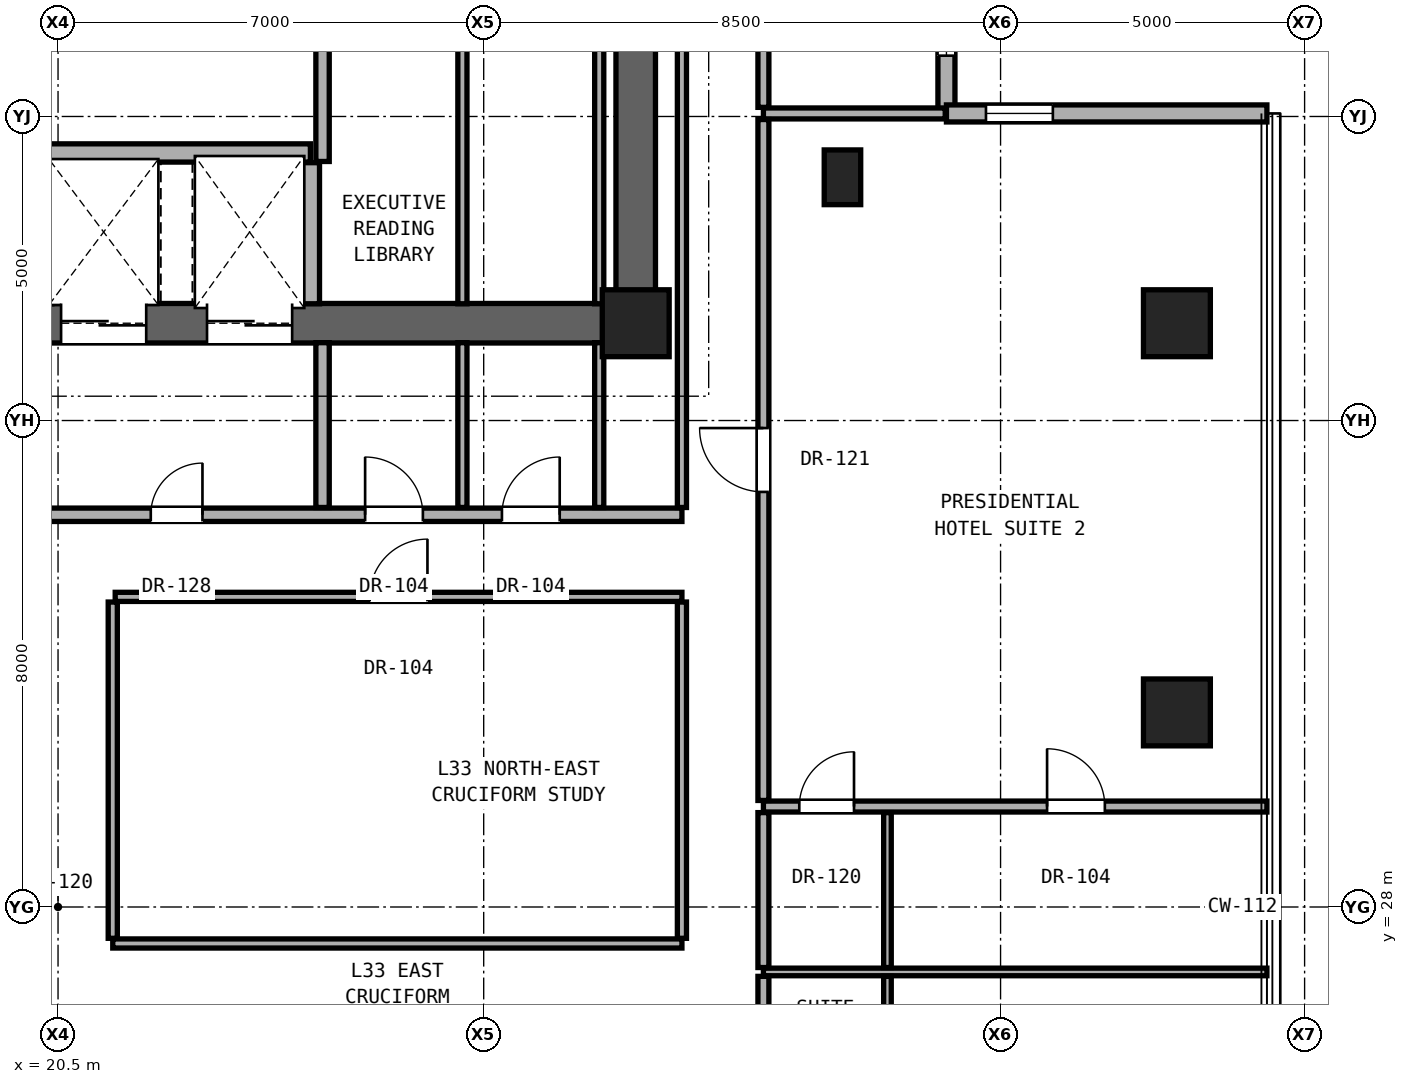
"""IFC4 building model, lengths in metres.
Left out: names, types, materials, properties, quantities, classifications, styles, units other than length and angle.
Written with IfcOpenShell. Run it as: python <this file> out.ifc"""

import sys

from ifc_helpers import new_model, si_unit, direction, frame, frame_2d, origin, origin_2d, place, context, subcontext, project, spatial, rectangle, hollow_rectangle, extrude, element, fill, save


model = new_model("IFC4")
c1 = context("Model", 3, precision=1e-05, world=origin(), true_north=direction((0.0, 1.0)))
c2 = subcontext(c1, "Body", "Model", "MODEL_VIEW")
j1 = project(units=[si_unit("LENGTHUNIT", "METRE"), si_unit("PLANEANGLEUNIT", "RADIAN")], contexts=[c1])
p1 = place(None, origin())
s1 = spatial("IfcSite", under=j1, at=p1, CompositionType="ELEMENT")
p2 = place(p1, origin())
s2 = spatial("IfcBuilding", under=s1, at=p2, CompositionType="ELEMENT")
p3 = place(p2, frame((0.0, 0.0, 118.1)))
s3 = spatial("IfcBuildingStorey", under=s2, at=p3, CompositionType="ELEMENT", Elevation=118.1)
p4 = place(p3, frame((30.0, 37.6, 0.0), z_axis=(0.0, 0.0, 1.0), x_axis=(1.0, 0.0, 0.0)))
e1 = element("IfcColumn", 1, at=p4, inside=s3, PredefinedType="COLUMN", context=c2, shape_type="SweptSolid", body=[
    extrude(rectangle(XDim=1.1, YDim=1.1, at=origin_2d()), origin(), (0.0, 0.0, 1.0), 3.3),
])
for number, where, z_axis, x_axis in (
    (2, (38.9, 31.2, 0.0), (0.0, 0.0, 1.0), (1.0, 0.0, 0.0)),
    (3, (38.9, 37.6, 0.0), (0.0, 0.0, 1.0), (1.0, 0.0, 0.0)),
):
    element("IfcColumn", number, at=place(p3, frame(where, z_axis=z_axis, x_axis=x_axis)), inside=s3, PredefinedType="COLUMN", context=c2, shape_type="SweptSolid", body=[
        extrude(hollow_rectangle(XDim=1.1, YDim=1.1, WallThickness=0.06, at=origin_2d()), origin(), (0.0, 0.0, 1.0), 3.3),
    ])
p5 = place(p3, frame((33.4, 40.0, 0.0), z_axis=(0.0, 0.0, 1.0), x_axis=(1.0, 0.0, 0.0)))
e4 = element("IfcColumn", 4, at=p5, inside=s3, PredefinedType="PILASTER", context=c2, shape_type="SweptSolid", body=[
    extrude(rectangle(XDim=0.6, YDim=0.9, at=origin_2d()), origin(), (0.0, 0.0, 1.0), 3.3),
])
p6 = place(p3, frame((30.0, 37.6, 0.0), z_axis=(0.0, 0.0, 1.0), x_axis=(0.0, 1.0, 0.0)))
e5 = element("IfcWall", 5, at=p6, inside=s3, PredefinedType="SHEAR", context=c2, shape_type="SweptSolid", body=[
    extrude(rectangle(XDim=6.0, YDim=0.65, at=frame_2d((3.0, 0.0))), origin(), (0.0, 0.0, 1.0), 3.08),
])
p7 = place(p3, frame((11.0, 37.6, 0.0), z_axis=(0.0, 0.0, 1.0), x_axis=(1.0, 0.0, 0.0)))
e6 = element("IfcWall", 6, at=p7, inside=s3, PredefinedType="SHEAR", context=c2, shape_type="SweptSolid", body=[
    extrude(rectangle(XDim=19.0, YDim=0.65, at=frame_2d((9.5, 0.0))), origin(), (0.0, 0.0, 1.0), 3.08),
])
p8 = place(p7, frame((1.06, 0.0, 0.0)))
e7 = element("IfcOpeningElement", 7, at=p8, cuts=e6, PredefinedType="OPENING", context=c2, shape_type="SweptSolid", body=[
    extrude(rectangle(XDim=1.15, YDim=2.2, at=frame_2d((0.575, 1.1))), frame((0.0, 0.335, 0.0), z_axis=(0.0, -1.0, 0.0), x_axis=(1.0, 0.0, 0.0)), (0.0, 0.0, 1.0), 0.67),
])
p9 = place(p7, frame((9.55, 0.0, 0.0)))
e8 = element("IfcOpeningElement", 8, at=p9, cuts=e6, PredefinedType="OPENING", context=c2, shape_type="SweptSolid", body=[
    extrude(rectangle(XDim=1.4, YDim=2.35, at=frame_2d((0.7, 1.175))), frame((0.0, 0.335, 0.0), z_axis=(0.0, -1.0, 0.0), x_axis=(1.0, 0.0, 0.0)), (0.0, 0.0, 1.0), 0.67),
])
p10 = place(p7, frame((11.95, 0.0, 0.0)))
e9 = element("IfcOpeningElement", 9, at=p10, cuts=e6, PredefinedType="OPENING", context=c2, shape_type="SweptSolid", body=[
    extrude(rectangle(XDim=1.4, YDim=2.35, at=frame_2d((0.7, 1.175))), frame((0.0, 0.335, 0.0), z_axis=(0.0, -1.0, 0.0), x_axis=(1.0, 0.0, 0.0)), (0.0, 0.0, 1.0), 0.67),
])
p11 = place(p3, frame((35.11, 41.05, 0.0), z_axis=(0.0, 0.0, 1.0), x_axis=(0.0, 1.0, 0.0)))
e10 = element("IfcWall", 10, at=p11, inside=s3, PredefinedType="SOLIDWALL", context=c2, shape_type="SweptSolid", body=[
    extrude(rectangle(XDim=5.27, YDim=0.28, at=frame_2d((2.635, 0.0))), origin(), (0.0, 0.0, 1.0), 3.06),
])
p12 = place(p11, frame((0.95, 0.0, 0.85)))
e11 = element("IfcOpeningElement", 11, at=p12, cuts=e10, PredefinedType="OPENING", context=c2, shape_type="SweptSolid", body=[
    extrude(rectangle(XDim=1.1, YDim=2.0, at=frame_2d((0.55, 1.0))), frame((0.0, 0.15, 0.0), z_axis=(0.0, -1.0, 0.0), x_axis=(1.0, 0.0, 0.0)), (0.0, 0.0, 1.0), 0.3),
])
p13 = place(p3, frame((40.38, 41.05, 0.0), z_axis=(0.0, 0.0, 1.0), x_axis=(-1.0, 0.0, 0.0)))
e12 = element("IfcWall", 12, at=p13, inside=s3, PredefinedType="SOLIDWALL", context=c2, shape_type="SweptSolid", body=[
    extrude(rectangle(XDim=5.27, YDim=0.28, at=frame_2d((2.635, 0.0))), origin(), (0.0, 0.0, 1.0), 3.06),
])
p14 = place(p13, frame((3.52, 0.0, 0.85)))
e13 = element("IfcOpeningElement", 13, at=p14, cuts=e12, PredefinedType="OPENING", context=c2, shape_type="SweptSolid", body=[
    extrude(rectangle(XDim=1.1, YDim=2.0, at=frame_2d((0.55, 1.0))), frame((0.0, 0.15, 0.0), z_axis=(0.0, -1.0, 0.0), x_axis=(1.0, 0.0, 0.0)), (0.0, 0.0, 1.0), 0.3),
])
p15 = place(p3, frame((32.1, 26.932, 0.0), z_axis=(0.0, 0.0, 1.0), x_axis=(1.0, 0.0, 0.0)))
e14 = element("IfcWall", 14, at=p15, inside=s3, PredefinedType="PARTITIONING", context=c2, shape_type="SweptSolid", body=[
    extrude(rectangle(XDim=8.28, YDim=0.125, at=frame_2d((4.14, 0.0))), origin(), (0.0, 0.0, 1.0), 2.299),
])
p16 = place(p3, frame((21.4, 27.4, 0.0), z_axis=(0.0, 0.0, 1.0), x_axis=(1.0, 0.0, 0.0)))
e15 = element("IfcWall", 15, at=p16, inside=s3, PredefinedType="PARTITIONING", context=c2, shape_type="SweptSolid", body=[
    extrude(rectangle(XDim=9.36, YDim=0.15, at=frame_2d((4.68, 0.0))), origin(), (0.0, 0.0, 1.0), 2.216),
])
p17 = place(p3, frame((32.1, 29.652, 0.0), z_axis=(0.0, 0.0, 1.0), x_axis=(1.0, 0.0, 0.0)))
e16 = element("IfcWall", 16, at=p17, inside=s3, PredefinedType="PARTITIONING", context=c2, shape_type="SweptSolid", body=[
    extrude(rectangle(XDim=8.28, YDim=0.18, at=frame_2d((4.14, 0.0))), origin(), (0.0, 0.0, 1.0), 2.299),
])
p18 = place(p17, frame((4.665, 0.0, 0.0)))
e17 = element("IfcOpeningElement", 17, at=p18, cuts=e16, PredefinedType="OPENING", context=c2, shape_type="SweptSolid", body=[
    extrude(rectangle(XDim=0.95, YDim=2.15, at=frame_2d((0.475, 1.075))), frame((0.0, 0.1, 0.0), z_axis=(0.0, -1.0, 0.0), x_axis=(1.0, 0.0, 0.0)), (0.0, 0.0, 1.0), 0.2),
])
p19 = place(p17, frame((0.59, 0.0, 0.0)))
e18 = element("IfcOpeningElement", 18, at=p19, cuts=e16, PredefinedType="OPENING", context=c2, shape_type="SweptSolid", body=[
    extrude(rectangle(XDim=0.9, YDim=2.1, at=frame_2d((0.45, 1.05))), frame((0.0, 0.1, 0.0), z_axis=(0.0, -1.0, 0.0), x_axis=(1.0, 0.0, 0.0)), (0.0, 0.0, 1.0), 0.2),
])
p20 = place(p3, frame((21.44, 33.1, 0.0), z_axis=(0.0, 0.0, 1.0), x_axis=(1.0, 0.0, 0.0)))
e19 = element("IfcWall", 19, at=p20, inside=s3, PredefinedType="PARTITIONING", context=c2, shape_type="SweptSolid", body=[
    extrude(rectangle(XDim=9.32, YDim=0.15, at=frame_2d((4.66, 0.0))), origin(), (0.0, 0.0, 1.0), 2.216),
])
p21 = place(p20, frame((4.185, 0.0, 0.0)))
e20 = element("IfcOpeningElement", 20, at=p21, cuts=e19, PredefinedType="OPENING", context=c2, shape_type="SweptSolid", body=[
    extrude(rectangle(XDim=0.95, YDim=2.15, at=frame_2d((0.475, 1.075))), frame((0.0, 0.085, 0.0), z_axis=(0.0, -1.0, 0.0), x_axis=(1.0, 0.0, 0.0)), (0.0, 0.0, 1.0), 0.17),
])
p22 = place(p3, frame((15.59, 34.45, 0.0), z_axis=(0.0, 0.0, 1.0), x_axis=(1.0, 0.0, 0.0)))
e21 = element("IfcWall", 21, at=p22, inside=s3, PredefinedType="SOLIDWALL", context=c2, shape_type="SweptSolid", body=[
    extrude(rectangle(XDim=15.17, YDim=0.22, at=frame_2d((7.585, 0.0))), origin(), (0.0, 0.0, 1.0), 2.216),
])
p23 = place(p22, frame((6.435, 0.0, 0.0)))
e22 = element("IfcOpeningElement", 22, at=p23, cuts=e21, PredefinedType="OPENING", context=c2, shape_type="SweptSolid", body=[
    extrude(rectangle(XDim=0.85, YDim=2.01, at=frame_2d((0.425, 1.005))), frame((0.0, 0.12, 0.0), z_axis=(0.0, -1.0, 0.0), x_axis=(1.0, 0.0, 0.0)), (0.0, 0.0, 1.0), 0.24),
])
p24 = place(p22, frame((9.96, 0.0, 0.0)))
e23 = element("IfcOpeningElement", 23, at=p24, cuts=e21, PredefinedType="OPENING", context=c2, shape_type="SweptSolid", body=[
    extrude(rectangle(XDim=0.95, YDim=2.15, at=frame_2d((0.475, 1.075))), frame((0.0, 0.12, 0.0), z_axis=(0.0, -1.0, 0.0), x_axis=(1.0, 0.0, 0.0)), (0.0, 0.0, 1.0), 0.24),
])
p25 = place(p22, frame((12.21, 0.0, 0.0)))
e24 = element("IfcOpeningElement", 24, at=p25, cuts=e21, PredefinedType="OPENING", context=c2, shape_type="SweptSolid", body=[
    extrude(rectangle(XDim=0.95, YDim=2.15, at=frame_2d((0.475, 1.075))), frame((0.0, 0.12, 0.0), z_axis=(0.0, -1.0, 0.0), x_axis=(1.0, 0.0, 0.0)), (0.0, 0.0, 1.0), 0.24),
])
p26 = place(p22, frame((0.675, 0.0, 0.0)))
e25 = element("IfcOpeningElement", 25, at=p26, cuts=e21, PredefinedType="OPENING", context=c2, shape_type="SweptSolid", body=[
    extrude(rectangle(XDim=0.85, YDim=2.01, at=frame_2d((0.425, 1.005))), frame((0.0, 0.12, 0.0), z_axis=(0.0, -1.0, 0.0), x_axis=(1.0, 0.0, 0.0)), (0.0, 0.0, 1.0), 0.24),
])
p27 = place(p22, frame((2.835, 0.0, 0.0)))
e26 = element("IfcOpeningElement", 26, at=p27, cuts=e21, PredefinedType="OPENING", context=c2, shape_type="SweptSolid", body=[
    extrude(rectangle(XDim=0.85, YDim=2.01, at=frame_2d((0.425, 1.005))), frame((0.0, 0.12, 0.0), z_axis=(0.0, -1.0, 0.0), x_axis=(1.0, 0.0, 0.0)), (0.0, 0.0, 1.0), 0.24),
])
p28 = place(p3, frame((20.25, 40.4, 0.0), z_axis=(0.0, 0.0, 1.0), x_axis=(1.0, 0.0, 0.0)))
e27 = element("IfcWall", 27, at=p28, inside=s3, PredefinedType="SOLIDWALL", context=c2, shape_type="SweptSolid", body=[
    extrude(rectangle(XDim=4.4, YDim=0.3, at=frame_2d((2.2, 0.0))), origin(), (0.0, 0.0, 1.0), 3.08),
])
p29 = place(p3, frame((32.1, 41.05, 0.0), z_axis=(0.0, 0.0, 1.0), x_axis=(1.0, 0.0, 0.0)))
e28 = element("IfcWall", 28, at=p29, inside=s3, PredefinedType="PARTITIONING", context=c2, shape_type="SweptSolid", body=[
    extrude(rectangle(XDim=2.99, YDim=0.18, at=frame_2d((1.495, 0.0))), origin(), (0.0, 0.0, 1.0), 3.08),
])
p30 = place(p3, frame((20.25, 37.92, 0.0), z_axis=(0.0, 0.0, 1.0), x_axis=(0.0, 1.0, 0.0)))
e29 = element("IfcWall", 29, at=p30, inside=s3, PredefinedType="SOLIDWALL", context=c2, shape_type="SweptSolid", body=[
    extrude(rectangle(XDim=2.32, YDim=0.3, at=frame_2d((1.16, 0.0))), origin(), (0.0, 0.0, 1.0), 3.08),
])
p31 = place(p3, frame((21.4, 27.485, 0.0), z_axis=(0.0, 0.0, 1.0), x_axis=(0.0, 1.0, 0.0)))
e30 = element("IfcWall", 30, at=p31, inside=s3, PredefinedType="PARTITIONING", context=c2, shape_type="SweptSolid", body=[
    extrude(rectangle(XDim=5.53, YDim=0.15, at=frame_2d((2.765, 0.0))), origin(), (0.0, 0.0, 1.0), 2.216),
])
p32 = place(p3, frame((24.65, 37.92, 0.0), z_axis=(0.0, 0.0, 1.0), x_axis=(0.0, 1.0, 0.0)))
e31 = element("IfcWall", 31, at=p32, inside=s3, PredefinedType="SOLIDWALL", context=c2, shape_type="SweptSolid", body=[
    extrude(rectangle(XDim=2.32, YDim=0.3, at=frame_2d((1.16, 0.0))), origin(), (0.0, 0.0, 1.0), 3.08),
])
p33 = place(p3, frame((24.85, 34.57, 0.0), z_axis=(0.0, 0.0, 1.0), x_axis=(0.0, 1.0, 0.0)))
e32 = element("IfcWall", 32, at=p33, inside=s3, PredefinedType="SOLIDWALL", context=c2, shape_type="SweptSolid", body=[
    extrude(rectangle(XDim=2.71, YDim=0.22, at=frame_2d((1.355, 0.0))), origin(), (0.0, 0.0, 1.0), 3.08),
])
p34 = place(p3, frame((24.85, 40.26, 0.0), z_axis=(0.0, 0.0, 1.0), x_axis=(0.0, 1.0, 0.0)))
e33 = element("IfcWall", 33, at=p34, inside=s3, PredefinedType="SOLIDWALL", context=c2, shape_type="SweptSolid", body=[
    extrude(rectangle(XDim=2.94, YDim=0.22, at=frame_2d((1.47, 0.0))), origin(), (0.0, 0.0, 1.0), 3.08),
])
p35 = place(p3, frame((27.15, 34.57, 0.0), z_axis=(0.0, 0.0, 1.0), x_axis=(0.0, 1.0, 0.0)))
e34 = element("IfcWall", 34, at=p35, inside=s3, PredefinedType="PARTITIONING", context=c2, shape_type="SweptSolid", body=[
    extrude(rectangle(XDim=2.71, YDim=0.15, at=frame_2d((1.355, 0.0))), origin(), (0.0, 0.0, 1.0), 3.08),
])
p36 = place(p3, frame((27.15, 37.92, 0.0), z_axis=(0.0, 0.0, 1.0), x_axis=(0.0, 1.0, 0.0)))
e35 = element("IfcWall", 35, at=p36, inside=s3, PredefinedType="PARTITIONING", context=c2, shape_type="SweptSolid", body=[
    extrude(rectangle(XDim=5.28, YDim=0.15, at=frame_2d((2.64, 0.0))), origin(), (0.0, 0.0, 1.0), 3.08),
])
p37 = place(p3, frame((29.4, 34.57, 0.0), z_axis=(0.0, 0.0, 1.0), x_axis=(0.0, 1.0, 0.0)))
e36 = element("IfcWall", 36, at=p37, inside=s3, PredefinedType="PARTITIONING", context=c2, shape_type="SweptSolid", body=[
    extrude(rectangle(XDim=2.71, YDim=0.15, at=frame_2d((1.355, 0.0))), origin(), (0.0, 0.0, 1.0), 3.08),
])
p38 = place(p3, frame((29.4, 37.92, 0.0), z_axis=(0.0, 0.0, 1.0), x_axis=(0.0, 1.0, 0.0)))
e37 = element("IfcWall", 37, at=p38, inside=s3, PredefinedType="PARTITIONING", context=c2, shape_type="SweptSolid", body=[
    extrude(rectangle(XDim=5.28, YDim=0.15, at=frame_2d((2.64, 0.0))), origin(), (0.0, 0.0, 1.0), 3.08),
])
p39 = place(p3, frame((30.76, 27.485, 0.0), z_axis=(0.0, 0.0, 1.0), x_axis=(0.0, 1.0, 0.0)))
e38 = element("IfcWall", 38, at=p39, inside=s3, PredefinedType="PARTITIONING", context=c2, shape_type="SweptSolid", body=[
    extrude(rectangle(XDim=5.53, YDim=0.15, at=frame_2d((2.765, 0.0))), origin(), (0.0, 0.0, 1.0), 2.299),
])
p40 = place(p3, frame((30.76, 34.57, 0.0), z_axis=(0.0, 0.0, 1.0), x_axis=(0.0, 1.0, 0.0)))
e39 = element("IfcWall", 39, at=p40, inside=s3, PredefinedType="PARTITIONING", context=c2, shape_type="SweptSolid", body=[
    extrude(rectangle(XDim=9.095, YDim=0.15, at=frame_2d((4.547, 0.0))), origin(), (0.0, 0.0, 1.0), 2.456),
])
p41 = place(p3, frame((32.1, 24.312, 0.0), z_axis=(0.0, 0.0, 1.0), x_axis=(0.0, 1.0, 0.0)))
e40 = element("IfcWall", 40, at=p41, inside=s3, PredefinedType="PARTITIONING", context=c2, shape_type="SweptSolid", body=[
    extrude(rectangle(XDim=2.548, YDim=0.18, at=frame_2d((1.274, 0.0))), origin(), (0.0, 0.0, 1.0), 2.299),
])
p42 = place(p3, frame((32.1, 27.004, 0.0), z_axis=(0.0, 0.0, 1.0), x_axis=(0.0, 1.0, 0.0)))
e41 = element("IfcWall", 41, at=p42, inside=s3, PredefinedType="PARTITIONING", context=c2, shape_type="SweptSolid", body=[
    extrude(rectangle(XDim=2.548, YDim=0.18, at=frame_2d((1.274, 0.0))), origin(), (0.0, 0.0, 1.0), 3.08),
])
p43 = place(p3, frame((32.1, 29.752, 0.0), z_axis=(0.0, 0.0, 1.0), x_axis=(0.0, 1.0, 0.0)))
e42 = element("IfcWall", 42, at=p43, inside=s3, PredefinedType="PARTITIONING", context=c2, shape_type="SweptSolid", body=[
    extrude(rectangle(XDim=11.198, YDim=0.18, at=frame_2d((5.599, 0.0))), origin(), (0.0, 0.0, 1.0), 2.299),
])
p44 = place(p43, frame((5.074, 0.0, 0.0)))
e43 = element("IfcOpeningElement", 43, at=p44, cuts=e42, PredefinedType="OPENING", context=c2, shape_type="SweptSolid", body=[
    extrude(rectangle(XDim=1.05, YDim=2.2, at=frame_2d((0.525, 1.1))), frame((0.0, 0.1, 0.0), z_axis=(0.0, -1.0, 0.0), x_axis=(1.0, 0.0, 0.0)), (0.0, 0.0, 1.0), 0.2),
])
p45 = place(p3, frame((32.1, 41.15, 0.0), z_axis=(0.0, 0.0, 1.0), x_axis=(0.0, 1.0, 0.0)))
e44 = element("IfcWall", 44, at=p45, inside=s3, PredefinedType="PARTITIONING", context=c2, shape_type="SweptSolid", body=[
    extrude(rectangle(XDim=5.17, YDim=0.18, at=frame_2d((2.585, 0.0))), origin(), (0.0, 0.0, 1.0), 3.08),
])
p46 = place(p45, frame((2.11, 0.0, 0.0)))
e45 = element("IfcOpeningElement", 45, at=p46, cuts=e44, PredefinedType="OPENING", context=c2, shape_type="SweptSolid", body=[
    extrude(rectangle(XDim=0.95, YDim=2.15, at=frame_2d((0.475, 1.075))), frame((0.0, 0.1, 0.0), z_axis=(0.0, -1.0, 0.0), x_axis=(1.0, 0.0, 0.0)), (0.0, 0.0, 1.0), 0.2),
])
p47 = place(p3, frame((34.14, 24.312, 0.0), z_axis=(0.0, 0.0, 1.0), x_axis=(0.0, 1.0, 0.0)))
e46 = element("IfcWall", 46, at=p47, inside=s3, PredefinedType="PARTITIONING", context=c2, shape_type="SweptSolid", body=[
    extrude(rectangle(XDim=2.548, YDim=0.125, at=frame_2d((1.274, 0.0))), origin(), (0.0, 0.0, 1.0), 2.299),
])
p48 = place(p3, frame((34.14, 27.004, 0.0), z_axis=(0.0, 0.0, 1.0), x_axis=(0.0, 1.0, 0.0)))
e47 = element("IfcWall", 47, at=p48, inside=s3, PredefinedType="PARTITIONING", context=c2, shape_type="SweptSolid", body=[
    extrude(rectangle(XDim=2.548, YDim=0.125, at=frame_2d((1.274, 0.0))), origin(), (0.0, 0.0, 1.0), 3.08),
])
p49 = place(p12, origin())
e48 = element("IfcWindow", 48, at=p49, inside=s3, PartitioningType="SINGLE_PANEL", PredefinedType="WINDOW", context=c2, shape_type="SweptSolid", body=[
    extrude(rectangle(XDim=1.1, YDim=2.0, at=frame_2d((0.55, 1.0))), frame((0.0, 0.03, 0.0), z_axis=(0.0, -1.0, 0.0), x_axis=(1.0, 0.0, 0.0)), (0.0, 0.0, 1.0), 0.06),
])
fill(e11, e48)
p50 = place(p14, origin())
e49 = element("IfcWindow", 49, at=p50, inside=s3, PartitioningType="SINGLE_PANEL", PredefinedType="WINDOW", context=c2, shape_type="SweptSolid", body=[
    extrude(rectangle(XDim=1.1, YDim=2.0, at=frame_2d((0.55, 1.0))), frame((0.0, 0.03, 0.0), z_axis=(0.0, -1.0, 0.0), x_axis=(1.0, 0.0, 0.0)), (0.0, 0.0, 1.0), 0.06),
])
fill(e13, e49)
p51 = place(p23, origin())
e50 = element("IfcDoor", 50, at=p51, inside=s3, OperationType="SINGLE_SWING_RIGHT", PredefinedType="DOOR", context=c2, shape_type="SweptSolid", body=[
    extrude(rectangle(XDim=0.85, YDim=2.01, at=frame_2d((0.425, 1.005))), frame((0.0, 0.025, 0.0), z_axis=(0.0, -1.0, 0.0), x_axis=(1.0, 0.0, 0.0)), (0.0, 0.0, 1.0), 0.05),
])
fill(e22, e50)
p52 = place(p24, origin())
e51 = element("IfcDoor", 51, at=p52, inside=s3, OperationType="SINGLE_SWING_LEFT", PredefinedType="DOOR", context=c2, shape_type="SweptSolid", body=[
    extrude(rectangle(XDim=0.95, YDim=2.15, at=frame_2d((0.475, 1.075))), frame((0.0, 0.025, 0.0), z_axis=(0.0, -1.0, 0.0), x_axis=(1.0, 0.0, 0.0)), (0.0, 0.0, 1.0), 0.05),
])
fill(e23, e51)
p53 = place(p25, origin())
e52 = element("IfcDoor", 52, at=p53, inside=s3, OperationType="SINGLE_SWING_RIGHT", PredefinedType="DOOR", context=c2, shape_type="SweptSolid", body=[
    extrude(rectangle(XDim=0.95, YDim=2.15, at=frame_2d((0.475, 1.075))), frame((0.0, 0.025, 0.0), z_axis=(0.0, -1.0, 0.0), x_axis=(1.0, 0.0, 0.0)), (0.0, 0.0, 1.0), 0.05),
])
fill(e24, e52)
p54 = place(p44, origin())
e53 = element("IfcDoor", 53, at=p54, inside=s3, OperationType="SINGLE_SWING_RIGHT", PredefinedType="DOOR", context=c2, shape_type="SweptSolid", body=[
    extrude(rectangle(XDim=1.05, YDim=2.2, at=frame_2d((0.525, 1.1))), frame((0.0, 0.025, 0.0), z_axis=(0.0, -1.0, 0.0), x_axis=(1.0, 0.0, 0.0)), (0.0, 0.0, 1.0), 0.05),
])
fill(e43, e53)
p55 = place(p18, origin())
e54 = element("IfcDoor", 54, at=p55, inside=s3, OperationType="SINGLE_SWING_LEFT", PredefinedType="DOOR", context=c2, shape_type="SweptSolid", body=[
    extrude(rectangle(XDim=0.95, YDim=2.15, at=frame_2d((0.475, 1.075))), frame((0.0, 0.025, 0.0), z_axis=(0.0, -1.0, 0.0), x_axis=(1.0, 0.0, 0.0)), (0.0, 0.0, 1.0), 0.05),
])
fill(e17, e54)
p56 = place(p19, origin())
e55 = element("IfcDoor", 55, at=p56, inside=s3, OperationType="SINGLE_SWING_RIGHT", PredefinedType="DOOR", context=c2, shape_type="SweptSolid", body=[
    extrude(rectangle(XDim=0.9, YDim=2.1, at=frame_2d((0.45, 1.05))), frame((0.0, 0.025, 0.0), z_axis=(0.0, -1.0, 0.0), x_axis=(1.0, 0.0, 0.0)), (0.0, 0.0, 1.0), 0.05),
])
fill(e18, e55)
p57 = place(p21, origin())
e56 = element("IfcDoor", 56, at=p57, inside=s3, OperationType="SINGLE_SWING_RIGHT", PredefinedType="DOOR", context=c2, shape_type="SweptSolid", body=[
    extrude(rectangle(XDim=0.95, YDim=2.15, at=frame_2d((0.475, 1.075))), frame((0.0, 0.025, 0.0), z_axis=(0.0, -1.0, 0.0), x_axis=(1.0, 0.0, 0.0)), (0.0, 0.0, 1.0), 0.05),
])
fill(e20, e56)
p58 = place(p9, origin())
e57 = element("IfcDoor", 57, at=p58, inside=s3, OperationType="DOUBLE_DOOR_SLIDING", PredefinedType="DOOR", context=c2, shape_type="SweptSolid", body=[
    extrude(rectangle(XDim=1.4, YDim=2.35, at=frame_2d((0.7, 1.175))), frame((0.0, 0.025, 0.0), z_axis=(0.0, -1.0, 0.0), x_axis=(1.0, 0.0, 0.0)), (0.0, 0.0, 1.0), 0.05),
])
fill(e8, e57)
p59 = place(p10, origin())
e58 = element("IfcDoor", 58, at=p59, inside=s3, OperationType="DOUBLE_DOOR_SLIDING", PredefinedType="DOOR", context=c2, shape_type="SweptSolid", body=[
    extrude(rectangle(XDim=1.4, YDim=2.35, at=frame_2d((0.7, 1.175))), frame((0.0, 0.025, 0.0), z_axis=(0.0, -1.0, 0.0), x_axis=(1.0, 0.0, 0.0)), (0.0, 0.0, 1.0), 0.05),
])
fill(e9, e58)
save(model, sys.argv[1])
